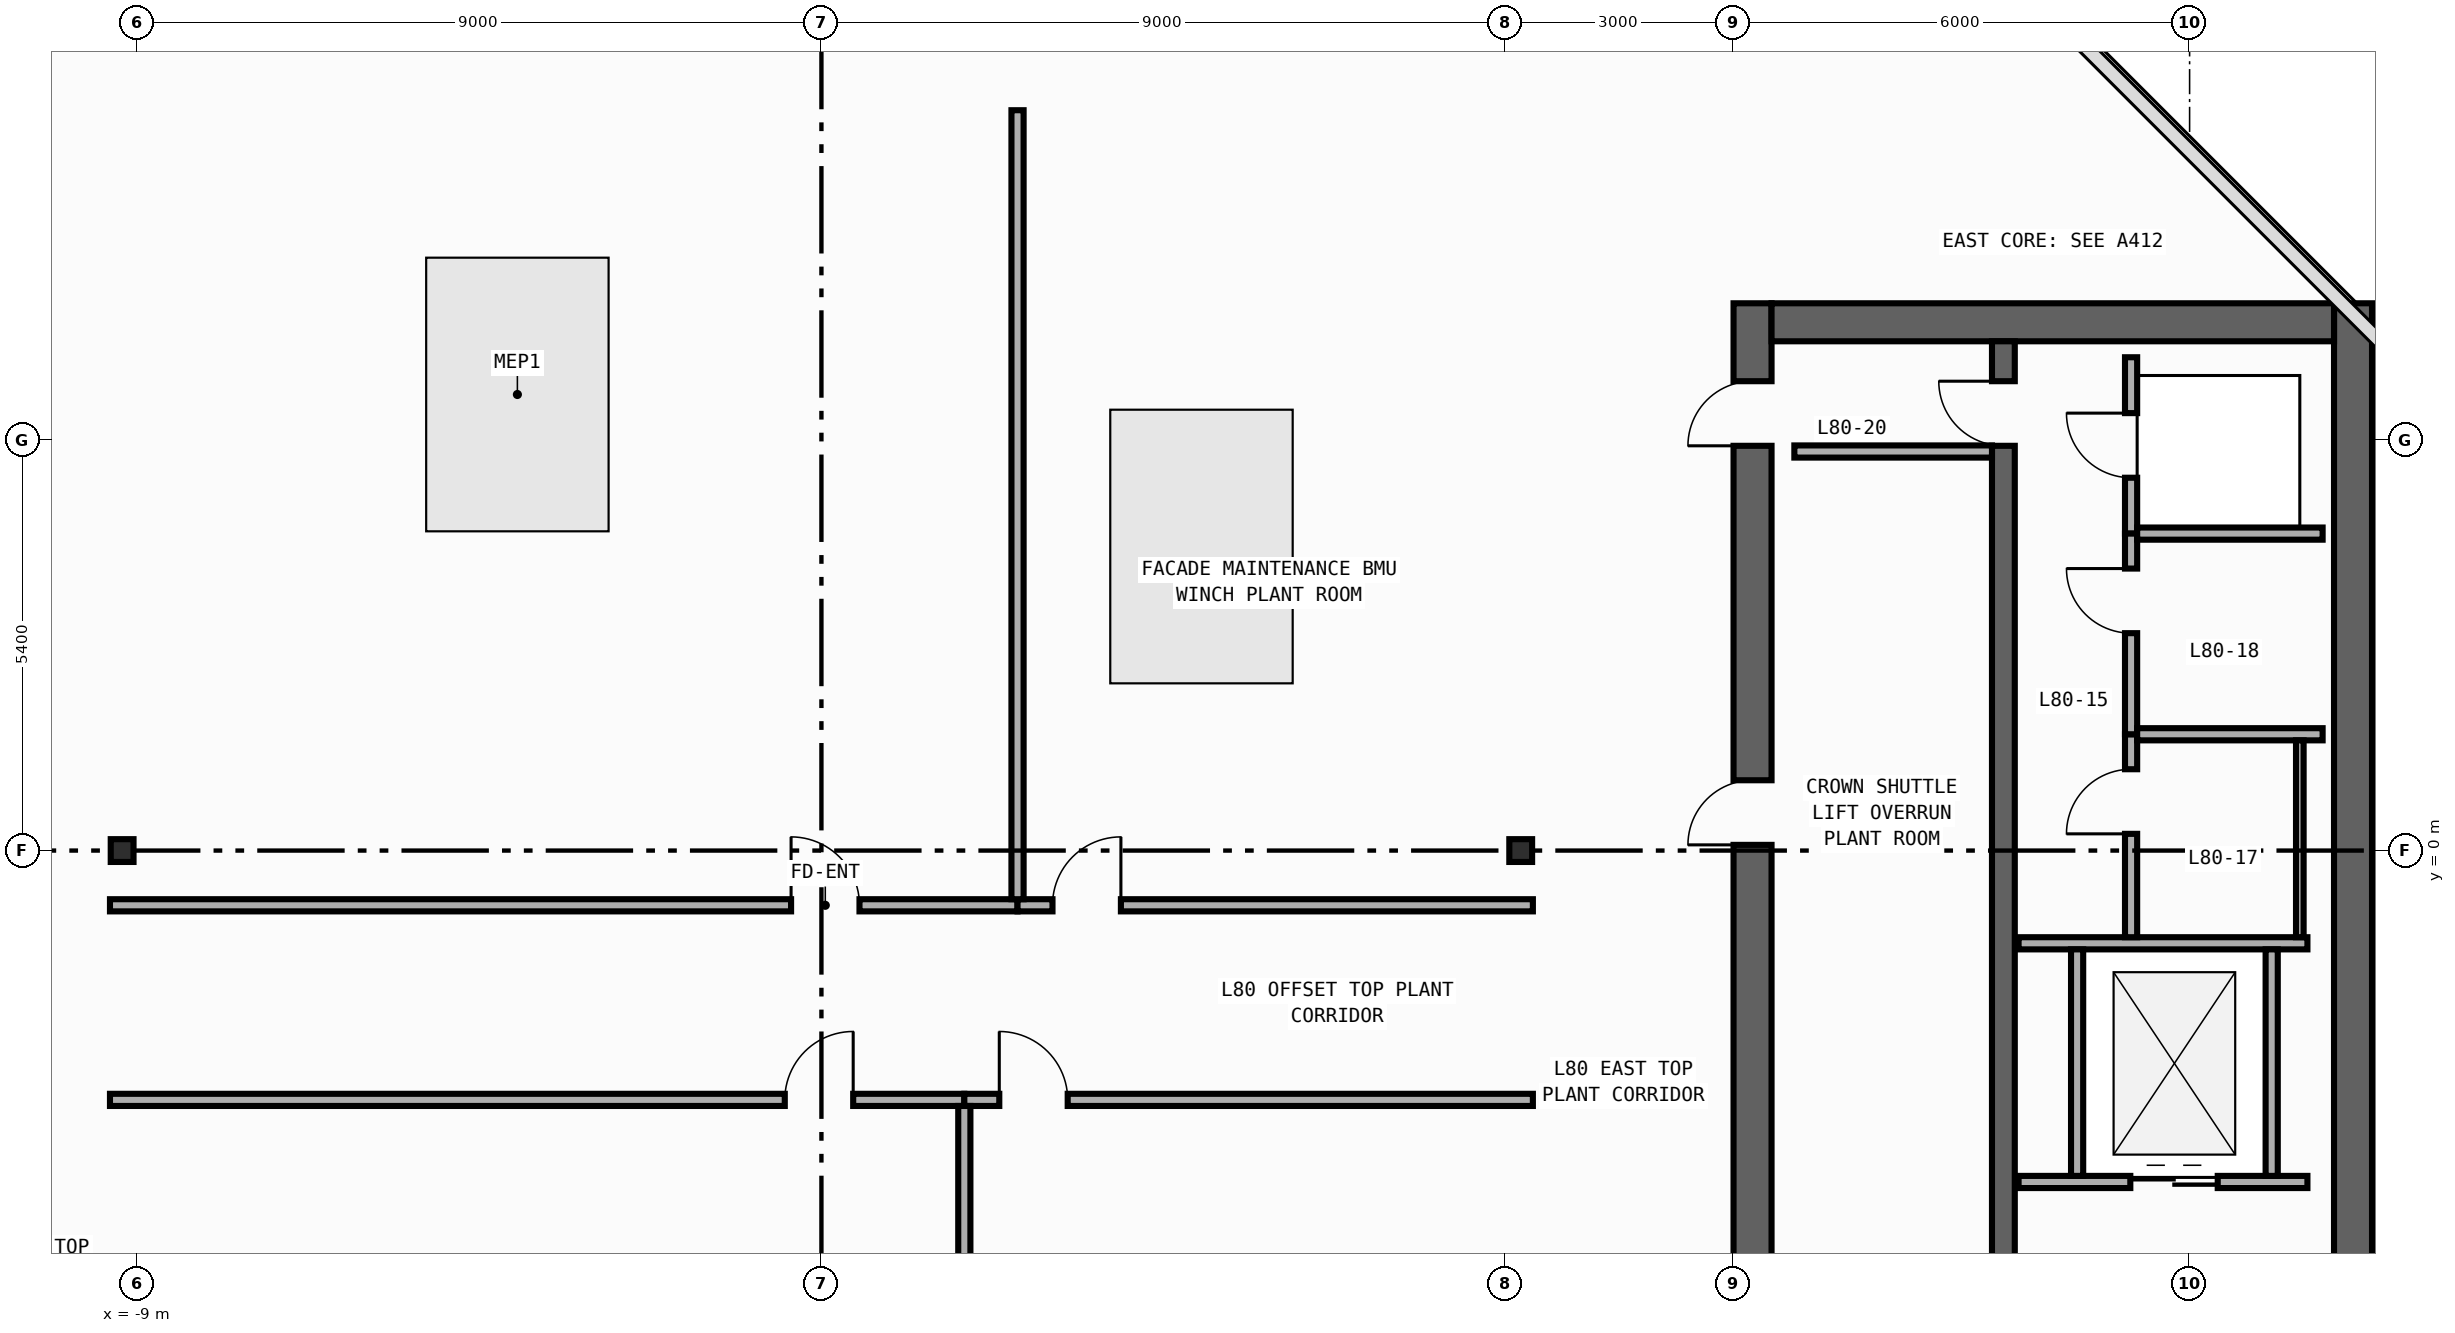
"""IFC4 building model, lengths in metres.
Left out: names, types, materials, properties, quantities, classifications, styles, units other than length and angle.
Written with IfcOpenShell. Run it as: python <this file> out.ifc"""

import sys

from ifc_helpers import new_model, si_unit, direction, frame, frame_2d, origin, origin_2d, place, context, subcontext, project, spatial, rectangle, i_section, extrude, element, fill, save


model = new_model("IFC4")
c1 = context("Model", 3, precision=1e-05, world=origin(), true_north=direction((0.0, 1.0)))
c2 = subcontext(c1, "Body", "Model", "MODEL_VIEW")
j1 = project(units=[si_unit("LENGTHUNIT", "METRE"), si_unit("PLANEANGLEUNIT", "RADIAN")], contexts=[c1])
p1 = place(None, origin())
s1 = spatial("IfcSite", under=j1, at=p1, CompositionType="ELEMENT")
p2 = place(p1, origin())
s2 = spatial("IfcBuilding", under=s1, at=p2, CompositionType="ELEMENT")
p3 = place(p2, frame((0.0, 0.0, 335.0)))
s3 = spatial("IfcBuildingStorey", under=s2, at=p3, CompositionType="ELEMENT", Elevation=335.0)
p4 = place(p3, frame((12.25, -19.8, 0.0), z_axis=(0.0, 0.0, 1.0), x_axis=(0.0, 1.0, 0.0)))
e1 = element("IfcWall", 1, at=p4, inside=s3, PredefinedType="SHEAR", context=c2, shape_type="SweptSolid", body=[
    extrude(rectangle(XDim=27.0, YDim=0.5, at=frame_2d((13.5, 0.0))), origin(), (0.0, 0.0, 1.0), 4.22),
])
p5 = place(p4, frame((19.875, 0.0, 0.0)))
e2 = element("IfcOpeningElement", 2, at=p5, cuts=e1, PredefinedType="OPENING", context=c2, shape_type="SweptSolid", body=[
    extrude(rectangle(XDim=0.85, YDim=2.1, at=frame_2d((0.425, 1.05))), frame((0.0, 0.26, 0.0), z_axis=(0.0, -1.0, 0.0), x_axis=(1.0, 0.0, 0.0)), (0.0, 0.0, 1.0), 0.52),
])
p6 = place(p4, frame((10.175, 0.0, 0.0)))
e3 = element("IfcOpeningElement", 3, at=p6, cuts=e1, PredefinedType="OPENING", context=c2, shape_type="SweptSolid", body=[
    extrude(rectangle(XDim=0.85, YDim=2.1, at=frame_2d((0.425, 1.05))), frame((0.0, 0.26, 0.0), z_axis=(0.0, -1.0, 0.0), x_axis=(1.0, 0.0, 0.0)), (0.0, 0.0, 1.0), 0.52),
])
p7 = place(p4, frame((12.725, 0.0, 0.0)))
e4 = element("IfcOpeningElement", 4, at=p7, cuts=e1, PredefinedType="OPENING", context=c2, shape_type="SweptSolid", body=[
    extrude(rectangle(XDim=1.15, YDim=2.2, at=frame_2d((0.575, 1.1))), frame((0.0, 0.26, 0.0), z_axis=(0.0, -1.0, 0.0), x_axis=(1.0, 0.0, 0.0)), (0.0, 0.0, 1.0), 0.52),
])
p8 = place(p4, frame((25.125, 0.0, 0.0)))
e5 = element("IfcOpeningElement", 5, at=p8, cuts=e1, PredefinedType="OPENING", context=c2, shape_type="SweptSolid", body=[
    extrude(rectangle(XDim=0.85, YDim=2.1, at=frame_2d((0.425, 1.05))), frame((0.0, 0.26, 0.0), z_axis=(0.0, -1.0, 0.0), x_axis=(1.0, 0.0, 0.0)), (0.0, 0.0, 1.0), 0.52),
])
p9 = place(p3, frame((20.15, -19.8, 0.0), z_axis=(0.0, 0.0, 1.0), x_axis=(0.0, 1.0, 0.0)))
e6 = element("IfcWall", 6, at=p9, inside=s3, PredefinedType="SHEAR", context=c2, shape_type="SweptSolid", body=[
    extrude(rectangle(XDim=27.0, YDim=0.5, at=frame_2d((13.5, 0.0))), origin(), (0.0, 0.0, 1.0), 4.22),
])
p10 = place(p3, frame((12.5, 6.95, 0.0), z_axis=(0.0, 0.0, 1.0), x_axis=(1.0, 0.0, 0.0)))
e7 = element("IfcWall", 7, at=p10, inside=s3, PredefinedType="SHEAR", context=c2, shape_type="SweptSolid", body=[
    extrude(rectangle(XDim=7.4, YDim=0.5, at=frame_2d((3.7, 0.0))), origin(), (0.0, 0.0, 1.0), 4.22),
])
p11 = place(p3, frame((15.55, -19.3, 0.0), z_axis=(0.0, 0.0, 1.0), x_axis=(0.0, 1.0, 0.0)))
e8 = element("IfcWall", 8, at=p11, inside=s3, PredefinedType="SHEAR", context=c2, shape_type="SweptSolid", body=[
    extrude(rectangle(XDim=26.0, YDim=0.3, at=frame_2d((13.0, 0.0))), origin(), (0.0, 0.0, 1.0), 4.22),
])
p12 = place(p11, frame((12.225, 0.0, 0.0)))
e9 = element("IfcOpeningElement", 9, at=p12, cuts=e8, PredefinedType="OPENING", context=c2, shape_type="SweptSolid", body=[
    extrude(rectangle(XDim=1.15, YDim=2.2, at=frame_2d((0.575, 1.1))), frame((0.0, 0.16, 0.0), z_axis=(0.0, -1.0, 0.0), x_axis=(1.0, 0.0, 0.0)), (0.0, 0.0, 1.0), 0.32),
])
p13 = place(p11, frame((24.625, 0.0, 0.0)))
e10 = element("IfcOpeningElement", 10, at=p13, cuts=e8, PredefinedType="OPENING", context=c2, shape_type="SweptSolid", body=[
    extrude(rectangle(XDim=0.85, YDim=2.1, at=frame_2d((0.425, 1.05))), frame((0.0, 0.16, 0.0), z_axis=(0.0, -1.0, 0.0), x_axis=(1.0, 0.0, 0.0)), (0.0, 0.0, 1.0), 0.32),
])
for number, where, z_axis, x_axis in (
    (11, (-9.2, 0.0, 0.0), (0.0, 0.0, 1.0), (1.0, 0.0, 0.0)),
    (12, (9.2, 0.0, 0.0), (0.0, 0.0, 1.0), (1.0, 0.0, 0.0)),
):
    element("IfcColumn", number, at=place(p3, frame(where, z_axis=z_axis, x_axis=x_axis)), inside=s3, PredefinedType="COLUMN", context=c2, shape_type="SweptSolid", body=[
        extrude(i_section(OverallWidth=0.3, OverallDepth=0.3, WebThickness=0.01, FlangeThickness=0.015, FilletRadius=0.018, at=origin_2d()), origin(), (0.0, 0.0, 1.0), 4.5),
    ])
p14 = place(p3, frame((15.75, -4.36, 0.0), z_axis=(0.0, 0.0, 1.0), x_axis=(1.0, 0.0, 0.0)))
e13 = element("IfcWall", 13, at=p14, inside=s3, PredefinedType="STANDARD", context=c2, shape_type="SweptSolid", body=[
    extrude(rectangle(XDim=3.8, YDim=0.16, at=frame_2d((1.9, 0.0))), origin(), (0.0, 0.0, 1.0), 4.22),
])
p15 = place(p14, frame((1.47, 0.0, 0.0)))
e14 = element("IfcOpeningElement", 14, at=p15, cuts=e13, PredefinedType="OPENING", context=c2, shape_type="SweptSolid", body=[
    extrude(rectangle(XDim=1.15, YDim=2.2, at=frame_2d((0.575, 1.1))), frame((0.0, 0.09, 0.0), z_axis=(0.0, -1.0, 0.0), x_axis=(1.0, 0.0, 0.0)), (0.0, 0.0, 1.0), 0.18),
])
p16 = place(p3, frame((15.75, -1.22, 0.0), z_axis=(0.0, 0.0, 1.0), x_axis=(1.0, 0.0, 0.0)))
e15 = element("IfcWall", 15, at=p16, inside=s3, PredefinedType="STANDARD", context=c2, shape_type="SweptSolid", body=[
    extrude(rectangle(XDim=3.8, YDim=0.16, at=frame_2d((1.9, 0.0))), origin(), (0.0, 0.0, 1.0), 4.22),
])
for number, where, z_axis, x_axis in (
    (16, (16.52, -4.28, 0.0), (0.0, 0.0, 1.0), (0.0, 1.0, 0.0)),
    (17, (19.08, -4.28, 0.0), (0.0, 0.0, 1.0), (0.0, 1.0, 0.0)),
):
    element("IfcWall", number, at=place(p3, frame(where, z_axis=z_axis, x_axis=x_axis)), inside=s3, PredefinedType="STANDARD", context=c2, shape_type="SweptSolid", body=[
        extrude(rectangle(XDim=2.98, YDim=0.16, at=frame_2d((1.49, 0.0))), origin(), (0.0, 0.0, 1.0), 4.22),
    ])
p17 = place(p3, frame((12.8, 5.25, 0.0), z_axis=(0.0, 0.0, 1.0), x_axis=(1.0, 0.0, 0.0)))
e18 = element("IfcWall", 18, at=p17, inside=s3, PredefinedType="STANDARD", context=c2, shape_type="SweptSolid", body=[
    extrude(rectangle(XDim=2.6, YDim=0.16, at=frame_2d((1.3, 0.0))), origin(), (0.0, 0.0, 1.0), 4.22),
])
p18 = place(p3, frame((17.23, 4.17, 0.0), z_axis=(0.0, 0.0, 1.0), x_axis=(0.0, 1.0, 0.0)))
e19 = element("IfcWall", 19, at=p18, inside=s3, PredefinedType="PARTITIONING", context=c2, shape_type="SweptSolid", body=[
    extrude(rectangle(XDim=2.32, YDim=0.16, at=frame_2d((1.16, 0.0))), origin(), (0.0, 0.0, 1.0), 4.22),
])
p19 = place(p18, frame((0.735, 0.0, 0.0)))
e20 = element("IfcOpeningElement", 20, at=p19, cuts=e19, PredefinedType="OPENING", context=c2, shape_type="SweptSolid", body=[
    extrude(rectangle(XDim=0.85, YDim=2.1, at=frame_2d((0.425, 1.05))), frame((0.0, 0.09, 0.0), z_axis=(0.0, -1.0, 0.0), x_axis=(1.0, 0.0, 0.0)), (0.0, 0.0, 1.0), 0.18),
])
p20 = place(p3, frame((17.23, -1.14, 0.0), z_axis=(0.0, 0.0, 1.0), x_axis=(0.0, 1.0, 0.0)))
e21 = element("IfcWall", 21, at=p20, inside=s3, PredefinedType="PARTITIONING", context=c2, shape_type="SweptSolid", body=[
    extrude(rectangle(XDim=2.67, YDim=0.16, at=frame_2d((1.335, 0.0))), origin(), (0.0, 0.0, 1.0), 4.22),
])
p21 = place(p20, frame((1.36, 0.0, 0.0)))
e22 = element("IfcOpeningElement", 22, at=p21, cuts=e21, PredefinedType="OPENING", context=c2, shape_type="SweptSolid", body=[
    extrude(rectangle(XDim=0.85, YDim=2.1, at=frame_2d((0.425, 1.05))), frame((0.0, 0.09, 0.0), z_axis=(0.0, -1.0, 0.0), x_axis=(1.0, 0.0, 0.0)), (0.0, 0.0, 1.0), 0.18),
])
p22 = place(p3, frame((17.23, 1.53, 0.0), z_axis=(0.0, 0.0, 1.0), x_axis=(0.0, 1.0, 0.0)))
e23 = element("IfcWall", 23, at=p22, inside=s3, PredefinedType="PARTITIONING", context=c2, shape_type="SweptSolid", body=[
    extrude(rectangle(XDim=2.64, YDim=0.16, at=frame_2d((1.32, 0.0))), origin(), (0.0, 0.0, 1.0), 4.22),
])
p23 = place(p22, frame((1.33, 0.0, 0.0)))
e24 = element("IfcOpeningElement", 24, at=p23, cuts=e23, PredefinedType="OPENING", context=c2, shape_type="SweptSolid", body=[
    extrude(rectangle(XDim=0.85, YDim=2.1, at=frame_2d((0.425, 1.05))), frame((0.0, 0.09, 0.0), z_axis=(0.0, -1.0, 0.0), x_axis=(1.0, 0.0, 0.0)), (0.0, 0.0, 1.0), 0.18),
])
for number, where, z_axis, x_axis in (
    (25, (17.31, 4.17, 0.0), (0.0, 0.0, 1.0), (1.0, 0.0, 0.0)),
    (26, (17.31, 1.53, 0.0), (0.0, 0.0, 1.0), (1.0, 0.0, 0.0)),
):
    element("IfcWall", number, at=place(p3, frame(where, z_axis=z_axis, x_axis=x_axis)), inside=s3, PredefinedType="PARTITIONING", context=c2, shape_type="SweptSolid", body=[
        extrude(rectangle(XDim=2.44, YDim=0.16, at=frame_2d((1.22, 0.0))), origin(), (0.0, 0.0, 1.0), 4.22),
    ])
p24 = place(p3, frame((-9.36, -0.72, 0.0), z_axis=(0.0, 0.0, 1.0), x_axis=(1.0, 0.0, 0.0)))
e27 = element("IfcWall", 27, at=p24, inside=s3, PredefinedType="PARTITIONING", context=c2, shape_type="SweptSolid", body=[
    extrude(rectangle(XDim=11.94, YDim=0.16, at=frame_2d((5.97, 0.0))), origin(), (0.0, 0.0, 1.0), 4.22),
])
p25 = place(p24, frame((8.961, 0.0, 0.0)))
e28 = element("IfcOpeningElement", 28, at=p25, cuts=e27, PredefinedType="OPENING", context=c2, shape_type="SweptSolid", body=[
    extrude(rectangle(XDim=0.9, YDim=2.15, at=frame_2d((0.45, 1.075))), frame((0.0, 0.09, 0.0), z_axis=(0.0, -1.0, 0.0), x_axis=(1.0, 0.0, 0.0)), (0.0, 0.0, 1.0), 0.18),
])
p26 = place(p3, frame((-9.36, -3.28, 0.0), z_axis=(0.0, 0.0, 1.0), x_axis=(1.0, 0.0, 0.0)))
e29 = element("IfcWall", 29, at=p26, inside=s3, PredefinedType="PARTITIONING", context=c2, shape_type="SweptSolid", body=[
    extrude(rectangle(XDim=11.24, YDim=0.16, at=frame_2d((5.62, 0.0))), origin(), (0.0, 0.0, 1.0), 4.22),
])
p27 = place(p26, frame((8.878, 0.0, 0.0)))
e30 = element("IfcOpeningElement", 30, at=p27, cuts=e29, PredefinedType="OPENING", context=c2, shape_type="SweptSolid", body=[
    extrude(rectangle(XDim=0.9, YDim=2.15, at=frame_2d((0.45, 1.075))), frame((0.0, 0.09, 0.0), z_axis=(0.0, -1.0, 0.0), x_axis=(1.0, 0.0, 0.0)), (0.0, 0.0, 1.0), 0.18),
])
p28 = place(p3, frame((1.88, -3.28, 0.0), z_axis=(0.0, 0.0, 1.0), x_axis=(1.0, 0.0, 0.0)))
e31 = element("IfcWall", 31, at=p28, inside=s3, PredefinedType="PARTITIONING", context=c2, shape_type="SweptSolid", body=[
    extrude(rectangle(XDim=7.48, YDim=0.16, at=frame_2d((3.74, 0.0))), origin(), (0.0, 0.0, 1.0), 4.22),
])
p29 = place(p28, frame((0.46, 0.0, 0.0)))
e32 = element("IfcOpeningElement", 32, at=p29, cuts=e31, PredefinedType="OPENING", context=c2, shape_type="SweptSolid", body=[
    extrude(rectangle(XDim=0.9, YDim=2.15, at=frame_2d((0.45, 1.075))), frame((0.0, 0.09, 0.0), z_axis=(0.0, -1.0, 0.0), x_axis=(1.0, 0.0, 0.0)), (0.0, 0.0, 1.0), 0.18),
])
p30 = place(p3, frame((2.58, -0.72, 0.0), z_axis=(0.0, 0.0, 1.0), x_axis=(1.0, 0.0, 0.0)))
e33 = element("IfcWall", 33, at=p30, inside=s3, PredefinedType="PARTITIONING", context=c2, shape_type="SweptSolid", body=[
    extrude(rectangle(XDim=6.78, YDim=0.16, at=frame_2d((3.39, 0.0))), origin(), (0.0, 0.0, 1.0), 4.22),
])
p31 = place(p30, frame((0.46, 0.0, 0.0)))
e34 = element("IfcOpeningElement", 34, at=p31, cuts=e33, PredefinedType="OPENING", context=c2, shape_type="SweptSolid", body=[
    extrude(rectangle(XDim=0.9, YDim=2.15, at=frame_2d((0.45, 1.075))), frame((0.0, 0.09, 0.0), z_axis=(0.0, -1.0, 0.0), x_axis=(1.0, 0.0, 0.0)), (0.0, 0.0, 1.0), 0.18),
])
p32 = place(p3, frame((2.58, -0.64, 0.0), z_axis=(0.0, 0.0, 1.0), x_axis=(0.0, 1.0, 0.0)))
e35 = element("IfcWall", 35, at=p32, inside=s3, PredefinedType="PARTITIONING", context=c2, shape_type="SweptSolid", body=[
    extrude(rectangle(XDim=10.38, YDim=0.16, at=frame_2d((5.19, 0.0))), origin(), (0.0, 0.0, 1.0), 4.22),
])
p33 = place(p3, frame((1.88, -19.755, 0.0), z_axis=(0.0, 0.0, 1.0), x_axis=(0.0, 1.0, 0.0)))
e36 = element("IfcWall", 36, at=p33, inside=s3, PredefinedType="PARTITIONING", context=c2, shape_type="SweptSolid", body=[
    extrude(rectangle(XDim=16.395, YDim=0.16, at=frame_2d((8.197, 0.0))), origin(), (0.0, 0.0, 1.0), 4.22),
])
p34 = place(p3, frame((19.45, 1.45, 0.0), z_axis=(0.0, 0.0, 1.0), x_axis=(0.0, -1.0, 0.0)))
e37 = element("IfcWall", 37, at=p34, inside=s3, PredefinedType="PARTITIONING", context=c2, shape_type="SweptSolid", body=[
    extrude(rectangle(XDim=2.59, YDim=0.1, at=frame_2d((1.295, 0.0))), origin(), (0.0, 0.0, 1.0), 4.22),
])
p35 = place(p5, origin())
e38 = element("IfcDoor", 38, at=p35, inside=s3, OperationType="SINGLE_SWING_LEFT", PredefinedType="DOOR", context=c2, shape_type="SweptSolid", body=[
    extrude(rectangle(XDim=0.85, YDim=2.1, at=frame_2d((0.425, 1.05))), frame((0.0, 0.025, 0.0), z_axis=(0.0, -1.0, 0.0), x_axis=(1.0, 0.0, 0.0)), (0.0, 0.0, 1.0), 0.05),
])
fill(e2, e38)
p36 = place(p8, origin())
e39 = element("IfcDoor", 39, at=p36, inside=s3, OperationType="SINGLE_SWING_LEFT", PredefinedType="DOOR", context=c2, shape_type="SweptSolid", body=[
    extrude(rectangle(XDim=0.85, YDim=2.1, at=frame_2d((0.425, 1.05))), frame((0.0, 0.025, 0.0), z_axis=(0.0, -1.0, 0.0), x_axis=(1.0, 0.0, 0.0)), (0.0, 0.0, 1.0), 0.05),
])
fill(e5, e39)
p37 = place(p13, origin())
e40 = element("IfcDoor", 40, at=p37, inside=s3, OperationType="SINGLE_SWING_RIGHT", PredefinedType="DOOR", context=c2, shape_type="SweptSolid", body=[
    extrude(rectangle(XDim=0.85, YDim=2.1, at=frame_2d((0.425, 1.05))), frame((0.0, 0.025, 0.0), z_axis=(0.0, -1.0, 0.0), x_axis=(1.0, 0.0, 0.0)), (0.0, 0.0, 1.0), 0.05),
])
fill(e10, e40)
p38 = place(p15, origin())
e41 = element("IfcDoor", 41, at=p38, inside=s3, OperationType="DOUBLE_DOOR_SLIDING", PredefinedType="DOOR", context=c2, shape_type="SweptSolid", body=[
    extrude(rectangle(XDim=1.15, YDim=2.2, at=frame_2d((0.575, 1.1))), frame((0.0, 0.025, 0.0), z_axis=(0.0, -1.0, 0.0), x_axis=(1.0, 0.0, 0.0)), (0.0, 0.0, 1.0), 0.05),
])
fill(e14, e41)
p39 = place(p19, origin())
e42 = element("IfcDoor", 42, at=p39, inside=s3, OperationType="SINGLE_SWING_RIGHT", PredefinedType="DOOR", context=c2, shape_type="SweptSolid", body=[
    extrude(rectangle(XDim=0.85, YDim=2.1, at=frame_2d((0.425, 1.05))), frame((0.0, 0.025, 0.0), z_axis=(0.0, -1.0, 0.0), x_axis=(1.0, 0.0, 0.0)), (0.0, 0.0, 1.0), 0.05),
])
fill(e20, e42)
p40 = place(p21, origin())
e43 = element("IfcDoor", 43, at=p40, inside=s3, OperationType="SINGLE_SWING_LEFT", PredefinedType="DOOR", context=c2, shape_type="SweptSolid", body=[
    extrude(rectangle(XDim=0.85, YDim=2.1, at=frame_2d((0.425, 1.05))), frame((0.0, 0.025, 0.0), z_axis=(0.0, -1.0, 0.0), x_axis=(1.0, 0.0, 0.0)), (0.0, 0.0, 1.0), 0.05),
])
fill(e22, e43)
p41 = place(p23, origin())
e44 = element("IfcDoor", 44, at=p41, inside=s3, OperationType="SINGLE_SWING_RIGHT", PredefinedType="DOOR", context=c2, shape_type="SweptSolid", body=[
    extrude(rectangle(XDim=0.85, YDim=2.1, at=frame_2d((0.425, 1.05))), frame((0.0, 0.025, 0.0), z_axis=(0.0, -1.0, 0.0), x_axis=(1.0, 0.0, 0.0)), (0.0, 0.0, 1.0), 0.05),
])
fill(e24, e44)
p42 = place(p25, origin())
e45 = element("IfcDoor", 45, at=p42, inside=s3, OperationType="SINGLE_SWING_LEFT", PredefinedType="DOOR", context=c2, shape_type="SweptSolid", body=[
    extrude(rectangle(XDim=0.9, YDim=2.15, at=frame_2d((0.45, 1.075))), frame((0.0, 0.025, 0.0), z_axis=(0.0, -1.0, 0.0), x_axis=(1.0, 0.0, 0.0)), (0.0, 0.0, 1.0), 0.05),
])
fill(e28, e45)
p43 = place(p27, origin())
e46 = element("IfcDoor", 46, at=p43, inside=s3, OperationType="SINGLE_SWING_RIGHT", PredefinedType="DOOR", context=c2, shape_type="SweptSolid", body=[
    extrude(rectangle(XDim=0.9, YDim=2.15, at=frame_2d((0.45, 1.075))), frame((0.0, 0.025, 0.0), z_axis=(0.0, -1.0, 0.0), x_axis=(1.0, 0.0, 0.0)), (0.0, 0.0, 1.0), 0.05),
])
fill(e30, e46)
p44 = place(p29, origin())
e47 = element("IfcDoor", 47, at=p44, inside=s3, OperationType="SINGLE_SWING_LEFT", PredefinedType="DOOR", context=c2, shape_type="SweptSolid", body=[
    extrude(rectangle(XDim=0.9, YDim=2.15, at=frame_2d((0.45, 1.075))), frame((0.0, 0.025, 0.0), z_axis=(0.0, -1.0, 0.0), x_axis=(1.0, 0.0, 0.0)), (0.0, 0.0, 1.0), 0.05),
])
fill(e32, e47)
p45 = place(p31, origin())
e48 = element("IfcDoor", 48, at=p45, inside=s3, OperationType="SINGLE_SWING_RIGHT", PredefinedType="DOOR", context=c2, shape_type="SweptSolid", body=[
    extrude(rectangle(XDim=0.9, YDim=2.15, at=frame_2d((0.45, 1.075))), frame((0.0, 0.025, 0.0), z_axis=(0.0, -1.0, 0.0), x_axis=(1.0, 0.0, 0.0)), (0.0, 0.0, 1.0), 0.05),
])
fill(e34, e48)
save(model, sys.argv[1])
